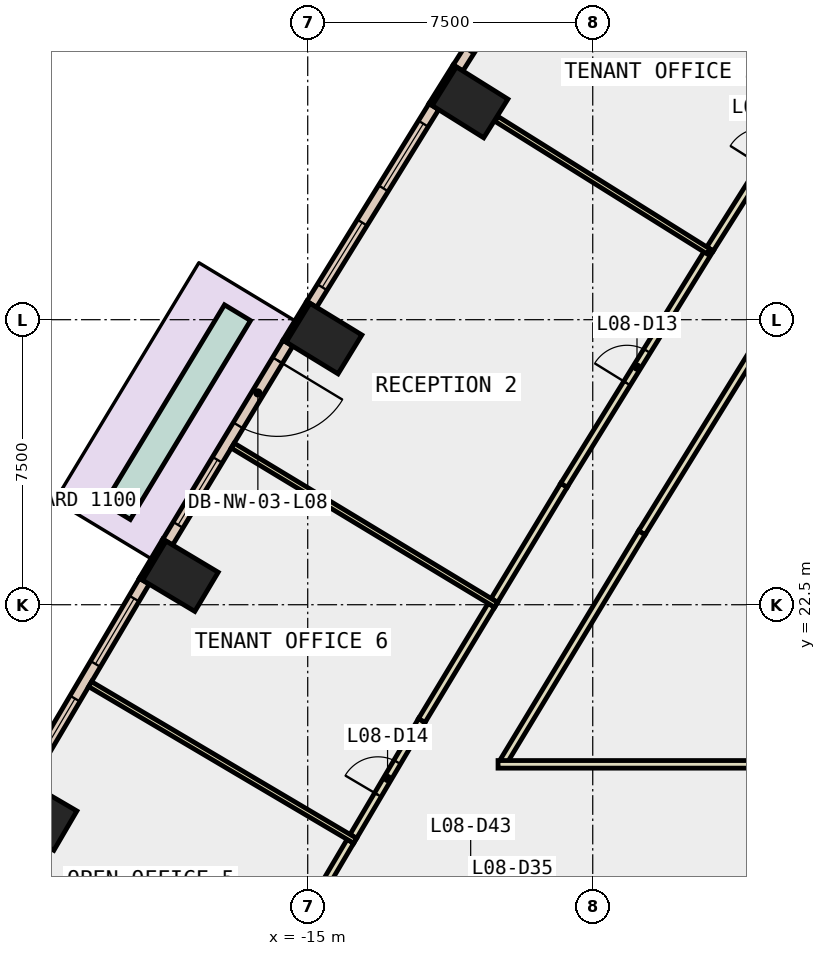
"""IFC4 building model, lengths in metres.
Left out: names, types, materials, properties, quantities, classifications, styles, units other than length and angle.
Written with IfcOpenShell. Run it as: python <this file> out.ifc"""

import sys

from ifc_helpers import new_model, si_unit, direction, frame, frame_2d, origin, origin_2d, place, context, subcontext, project, spatial, rectangle, extrude, element, fill, save


model = new_model("IFC4")
c1 = context("Model", 3, precision=1e-05, world=origin(), true_north=direction((0.0, 1.0)))
c2 = subcontext(c1, "Body", "Model", "MODEL_VIEW")
j1 = project(units=[si_unit("LENGTHUNIT", "METRE"), si_unit("PLANEANGLEUNIT", "RADIAN")], contexts=[c1])
p1 = place(None, origin())
s1 = spatial("IfcSite", under=j1, at=p1, CompositionType="ELEMENT")
p2 = place(p1, origin())
s2 = spatial("IfcBuilding", under=s1, at=p2, CompositionType="ELEMENT")
p3 = place(p2, frame((0.0, 0.0, 43.4)))
s3 = spatial("IfcBuildingStorey", under=s2, at=p3, CompositionType="ELEMENT", Elevation=43.4)
for number, where, z_axis, x_axis in (
    (1, (-10.729, 35.719, -0.4), (0.0, 0.0, 1.0), (0.53, 0.848, 0.0)),
    (2, (-14.571, 29.504, -0.4), (0.0, 0.0, 1.0), (0.522, 0.853, 0.0)),
    (3, (-18.35, 23.25, -0.4), (0.0, 0.0, 1.0), (0.513, 0.858, 0.0)),
    (4, (-22.068, 16.959, -0.4), (0.0, 0.0, 1.0), (0.504, 0.864, 0.0)),
):
    element("IfcColumn", number, at=place(p3, frame(where, z_axis=z_axis, x_axis=x_axis)), inside=s3, PredefinedType="COLUMN", context=c2, shape_type="SweptSolid", body=[
        extrude(rectangle(XDim=1.2, YDim=1.6, at=origin_2d()), origin(), (0.0, 0.0, 1.0), 4.2),
    ])
p4 = place(p3, frame((-11.132, 36.678, 0.0), z_axis=(0.0, 0.0, 1.0), x_axis=(-0.53018187123, -0.847883944546, 0.0)))
e5 = element("IfcWall", 5, at=p4, inside=s3, PredefinedType="STANDARD", context=c2, shape_type="SweptSolid", body=[
    extrude(rectangle(XDim=1.199, YDim=0.1, at=frame_2d((0.6, 0.0))), origin(), (0.0, 0.0, 1.0), 3.8),
])
for number, where, z_axis, x_axis in (
    (6, (-14.983, 30.459, 0.0), (0.0, 0.0, 1.0), (-0.522, -0.853, 0.0)),
    (7, (-18.772, 24.201, 0.0), (0.0, 0.0, 1.0), (-0.513, -0.858, 0.0)),
):
    element("IfcWall", number, at=place(p3, frame(where, z_axis=z_axis, x_axis=x_axis)), inside=s3, PredefinedType="STANDARD", context=c2, shape_type="SweptSolid", body=[
        extrude(rectangle(XDim=1.2, YDim=0.1, at=frame_2d((0.6, 0.0))), origin(), (0.0, 0.0, 1.0), 3.8),
    ])
p5 = place(p3, frame((-7.789, 41.773, 0.0), z_axis=(0.0, 0.0, 1.0), x_axis=(-0.53437888117, -0.845245059944, 0.0)))
e8 = element("IfcWall", 8, at=p5, inside=s3, PredefinedType="STANDARD", context=c2, shape_type="SweptSolid", body=[
    extrude(rectangle(XDim=6.093, YDim=0.3, at=frame_2d((3.046, 0.0))), origin(), (0.0, 0.0, 1.0), 3.8),
])
p6 = place(p5, frame((0.523, 0.0, 0.9)))
e9 = element("IfcOpeningElement", 9, at=p6, cuts=e8, PredefinedType="OPENING", context=c2, shape_type="SweptSolid", body=[
    extrude(rectangle(XDim=2.0, YDim=2.6, at=frame_2d((1.0, 1.3))), frame((0.0, 0.16, 0.0), z_axis=(0.0, -1.0, 0.0), x_axis=(1.0, 0.0, 0.0)), (0.0, 0.0, 1.0), 0.32),
])
p7 = place(p5, frame((3.57, 0.0, 0.9)))
e10 = element("IfcOpeningElement", 10, at=p7, cuts=e8, PredefinedType="OPENING", context=c2, shape_type="SweptSolid", body=[
    extrude(rectangle(XDim=2.0, YDim=2.6, at=frame_2d((1.0, 1.3))), frame((0.0, 0.16, 0.0), z_axis=(0.0, -1.0, 0.0), x_axis=(1.0, 0.0, 0.0)), (0.0, 0.0, 1.0), 0.32),
])
p8 = place(p3, frame((-11.68, 35.607, 0.0), z_axis=(0.0, 0.0, 1.0), x_axis=(-0.525791118496, -0.850613719447, 0.0)))
e11 = element("IfcWall", 11, at=p8, inside=s3, PredefinedType="STANDARD", context=c2, shape_type="SweptSolid", body=[
    extrude(rectangle(XDim=6.117, YDim=0.3, at=frame_2d((3.058, 0.0))), origin(), (0.0, 0.0, 1.0), 3.8),
])
p9 = place(p8, frame((0.529, 0.0, 0.9)))
e12 = element("IfcOpeningElement", 12, at=p9, cuts=e11, PredefinedType="OPENING", context=c2, shape_type="SweptSolid", body=[
    extrude(rectangle(XDim=2.0, YDim=2.6, at=frame_2d((1.0, 1.3))), frame((0.0, 0.16, 0.0), z_axis=(0.0, -1.0, 0.0), x_axis=(1.0, 0.0, 0.0)), (0.0, 0.0, 1.0), 0.32),
])
p10 = place(p8, frame((3.588, 0.0, 0.9)))
e13 = element("IfcOpeningElement", 13, at=p10, cuts=e11, PredefinedType="OPENING", context=c2, shape_type="SweptSolid", body=[
    extrude(rectangle(XDim=2.0, YDim=2.6, at=frame_2d((1.0, 1.3))), frame((0.0, 0.16, 0.0), z_axis=(0.0, -1.0, 0.0), x_axis=(1.0, 0.0, 0.0)), (0.0, 0.0, 1.0), 0.32),
])
p11 = place(p3, frame((-15.521, 29.382, 0.0), z_axis=(0.0, 0.0, 1.0), x_axis=(-0.517211293816, -0.855857743757, 0.0)))
e14 = element("IfcWall", 14, at=p11, inside=s3, PredefinedType="STANDARD", context=c2, shape_type="SweptSolid", body=[
    extrude(rectangle(XDim=6.116, YDim=0.3, at=frame_2d((3.058, 0.0))), origin(), (0.0, 0.0, 1.0), 3.8),
])
p12 = place(p11, frame((0.529, 0.0, 0.0)))
e15 = element("IfcOpeningElement", 15, at=p12, cuts=e14, PredefinedType="OPENING", context=c2, shape_type="SweptSolid", body=[
    extrude(rectangle(XDim=2.0, YDim=2.4, at=frame_2d((1.0, 1.2))), frame((0.0, 0.16, 0.0), z_axis=(0.0, -1.0, 0.0), x_axis=(1.0, 0.0, 0.0)), (0.0, 0.0, 1.0), 0.32),
])
p13 = place(p11, frame((3.587, 0.0, 0.9)))
e16 = element("IfcOpeningElement", 16, at=p13, cuts=e14, PredefinedType="OPENING", context=c2, shape_type="SweptSolid", body=[
    extrude(rectangle(XDim=2.0, YDim=2.6, at=frame_2d((1.0, 1.3))), frame((0.0, 0.16, 0.0), z_axis=(0.0, -1.0, 0.0), x_axis=(1.0, 0.0, 0.0)), (0.0, 0.0, 1.0), 0.32),
])
p14 = place(p3, frame((-19.299, 23.119, 0.0), z_axis=(0.0, 0.0, 1.0), x_axis=(-0.508749483145, -0.860914608658, 0.0)))
e17 = element("IfcWall", 17, at=p14, inside=s3, PredefinedType="STANDARD", context=c2, shape_type="SweptSolid", body=[
    extrude(rectangle(XDim=6.117, YDim=0.3, at=frame_2d((3.058, 0.0))), origin(), (0.0, 0.0, 1.0), 3.8),
])
p15 = place(p14, frame((0.529, 0.0, 0.9)))
e18 = element("IfcOpeningElement", 18, at=p15, cuts=e17, PredefinedType="OPENING", context=c2, shape_type="SweptSolid", body=[
    extrude(rectangle(XDim=2.0, YDim=2.6, at=frame_2d((1.0, 1.3))), frame((0.0, 0.16, 0.0), z_axis=(0.0, -1.0, 0.0), x_axis=(1.0, 0.0, 0.0)), (0.0, 0.0, 1.0), 0.32),
])
p16 = place(p14, frame((3.588, 0.0, 0.9)))
e19 = element("IfcOpeningElement", 19, at=p16, cuts=e17, PredefinedType="OPENING", context=c2, shape_type="SweptSolid", body=[
    extrude(rectangle(XDim=2.0, YDim=2.6, at=frame_2d((1.0, 1.3))), frame((0.0, 0.16, 0.0), z_axis=(0.0, -1.0, 0.0), x_axis=(1.0, 0.0, 0.0)), (0.0, 0.0, 1.0), 0.32),
])
p17 = place(p3, frame((-16.848, 30.184, 0.0), z_axis=(0.0, 0.0, 1.0), x_axis=(-0.517211293816, -0.855857743757, 0.0)))
e20 = element("IfcWall", 20, at=p17, inside=s3, PredefinedType="STANDARD", context=c2, shape_type="SweptSolid", body=[
    extrude(rectangle(XDim=6.116, YDim=0.8, at=frame_2d((3.058, 0.0))), origin(), (0.0, 0.0, 1.0), 0.8),
])
p18 = place(p3, frame((-2.419, 30.524, 0.0), z_axis=(0.0, 0.0, 1.0), x_axis=(-0.525766851327, -0.850628719269, 0.0)))
e21 = element("IfcWall", 21, at=p18, inside=s3, PredefinedType="PARTITIONING", context=c2, shape_type="SweptSolid", body=[
    extrude(rectangle(XDim=7.208, YDim=0.2, at=frame_2d((3.604, 0.0))), origin(), (0.0, 0.0, 1.0), 3.8),
])
p19 = place(p3, frame((-6.209, 24.392, 0.0), z_axis=(0.0, 0.0, 1.0), x_axis=(-0.51736780002, -0.85576314451, 0.0)))
e22 = element("IfcWall", 22, at=p19, inside=s3, PredefinedType="PARTITIONING", context=c2, shape_type="SweptSolid", body=[
    extrude(rectangle(XDim=7.018, YDim=0.2, at=frame_2d((3.509, 0.0))), origin(), (0.0, 0.0, 1.0), 3.8),
])
p20 = place(p3, frame((-4.414, 31.86, 0.0), z_axis=(0.0, 0.0, 1.0), x_axis=(0.534428477307, 0.845213702352, 0.0)))
e23 = element("IfcWall", 23, at=p20, inside=s3, PredefinedType="PARTITIONING", context=c2, shape_type="SweptSolid", body=[
    extrude(rectangle(XDim=6.158, YDim=0.2, at=frame_2d((3.079, 0.0))), origin(), (0.0, 0.0, 1.0), 3.8),
])
p21 = place(p20, frame((2.579, 0.0, 0.0)))
e24 = element("IfcOpeningElement", 24, at=p21, cuts=e23, PredefinedType="OPENING", context=c2, shape_type="SweptSolid", body=[
    extrude(rectangle(XDim=1.0, YDim=2.1, at=frame_2d((0.5, 1.05))), frame((0.0, 0.11, 0.0), z_axis=(0.0, -1.0, 0.0), x_axis=(1.0, 0.0, 0.0)), (0.0, 0.0, 1.0), 0.22),
])
p22 = place(p3, frame((-10.089, 22.613, 0.0), z_axis=(0.0, 0.0, 1.0), x_axis=(0.517280808896, 0.855815730603, 0.0)))
e25 = element("IfcWall", 25, at=p22, inside=s3, PredefinedType="PARTITIONING", context=c2, shape_type="SweptSolid", body=[
    extrude(rectangle(XDim=3.542, YDim=0.2, at=frame_2d((1.771, 0.0))), origin(), (0.0, 0.0, 1.0), 3.8),
])
p23 = place(p3, frame((-8.257, 25.644, 0.0), z_axis=(0.0, 0.0, 1.0), x_axis=(0.525857693262, 0.850572563887, 0.0)))
e26 = element("IfcWall", 26, at=p23, inside=s3, PredefinedType="PARTITIONING", context=c2, shape_type="SweptSolid", body=[
    extrude(rectangle(XDim=7.308, YDim=0.2, at=frame_2d((3.654, 0.0))), origin(), (0.0, 0.0, 1.0), 3.8),
])
p24 = place(p23, frame((3.154, 0.0, 0.0)))
e27 = element("IfcOpeningElement", 27, at=p24, cuts=e26, PredefinedType="OPENING", context=c2, shape_type="SweptSolid", body=[
    extrude(rectangle(XDim=1.0, YDim=2.1, at=frame_2d((0.5, 1.05))), frame((0.0, 0.11, 0.0), z_axis=(0.0, -1.0, 0.0), x_axis=(1.0, 0.0, 0.0)), (0.0, 0.0, 1.0), 0.22),
])
p25 = place(p3, frame((-13.8, 16.404, 0.0), z_axis=(0.0, 0.0, 1.0), x_axis=(0.508666621784, 0.860963569428, 0.0)))
e28 = element("IfcWall", 28, at=p25, inside=s3, PredefinedType="PARTITIONING", context=c2, shape_type="SweptSolid", body=[
    extrude(rectangle(XDim=3.542, YDim=0.2, at=frame_2d((1.771, 0.0))), origin(), (0.0, 0.0, 1.0), 3.8),
])
p26 = place(p25, frame((1.271, 0.0, 0.0)))
e29 = element("IfcOpeningElement", 29, at=p26, cuts=e28, PredefinedType="OPENING", context=c2, shape_type="SweptSolid", body=[
    extrude(rectangle(XDim=1.0, YDim=2.1, at=frame_2d((0.5, 1.05))), frame((0.0, 0.11, 0.0), z_axis=(0.0, -1.0, 0.0), x_axis=(1.0, 0.0, 0.0)), (0.0, 0.0, 1.0), 0.22),
])
p27 = place(p3, frame((-11.998, 19.454, 0.0), z_axis=(0.0, 0.0, 1.0), x_axis=(0.51707881094, 0.85593779171, 0.0)))
e30 = element("IfcWall", 30, at=p27, inside=s3, PredefinedType="PARTITIONING", context=c2, shape_type="SweptSolid", body=[
    extrude(rectangle(XDim=3.541, YDim=0.2, at=frame_2d((1.771, 0.0))), origin(), (0.0, 0.0, 1.0), 3.8),
])
p28 = place(p3, frame((-15.678, 13.226, 0.0), z_axis=(0.0, 0.0, 1.0), x_axis=(0.508613166028, 0.860995149431, 0.0)))
e31 = element("IfcWall", 31, at=p28, inside=s3, PredefinedType="PARTITIONING", context=c2, shape_type="SweptSolid", body=[
    extrude(rectangle(XDim=3.541, YDim=0.2, at=frame_2d((1.771, 0.0))), origin(), (0.0, 0.0, 1.0), 3.8),
])
p29 = place(p28, frame((1.271, 0.0, 0.0)))
e32 = element("IfcOpeningElement", 32, at=p29, cuts=e31, PredefinedType="OPENING", context=c2, shape_type="SweptSolid", body=[
    extrude(rectangle(XDim=1.0, YDim=2.1, at=frame_2d((0.5, 1.05))), frame((0.0, 0.11, 0.0), z_axis=(0.0, -1.0, 0.0), x_axis=(1.0, 0.0, 0.0)), (0.0, 0.0, 1.0), 0.22),
])
p30 = place(p3, frame((-9.992, 18.3, 0.0), z_axis=(0.0, 0.0, 1.0), x_axis=(1.0, 0.0, 0.0)))
e33 = element("IfcWall", 33, at=p30, inside=s3, PredefinedType="PARTITIONING", context=c2, shape_type="SweptSolid", body=[
    extrude(rectangle(XDim=9.592, YDim=0.2, at=frame_2d((4.796, 0.0))), origin(), (0.0, 0.0, 1.0), 3.8),
])
p31 = place(p3, frame((-1.06, 36.98, 0.0), z_axis=(0.0, 0.0, 1.0), x_axis=(-0.770307911054, 0.6376721118, 0.0)))
e34 = element("IfcWall", 34, at=p31, inside=s3, PredefinedType="PARTITIONING", context=c2, shape_type="SweptSolid", body=[
    extrude(rectangle(XDim=6.748, YDim=0.15, at=frame_2d((3.374, 0.0))), origin(), (0.0, 0.0, 1.0), 3.8),
])
p32 = place(p3, frame((-4.454, 31.796, 0.0), z_axis=(0.0, 0.0, 1.0), x_axis=(-0.847954529694, 0.530068972467, 0.0)))
e35 = element("IfcWall", 35, at=p32, inside=s3, PredefinedType="PARTITIONING", context=c2, shape_type="SweptSolid", body=[
    extrude(rectangle(XDim=6.58, YDim=0.15, at=frame_2d((3.29, 0.0))), origin(), (0.0, 0.0, 1.0), 3.8),
])
p33 = place(p3, frame((-10.042, 22.497, 0.0), z_axis=(0.0, 0.0, 1.0), x_axis=(-0.855818252, 0.517276637346, 0.0)))
e36 = element("IfcWall", 36, at=p33, inside=s3, PredefinedType="PARTITIONING", context=c2, shape_type="SweptSolid", body=[
    extrude(rectangle(XDim=8.1, YDim=0.15, at=frame_2d((4.05, 0.0))), origin(), (0.0, 0.0, 1.0), 3.8),
])
p34 = place(p3, frame((-13.752, 16.289, 0.0), z_axis=(0.0, 0.0, 1.0), x_axis=(-0.86093852802, 0.508709004216, 0.0)))
e37 = element("IfcWall", 37, at=p34, inside=s3, PredefinedType="PARTITIONING", context=c2, shape_type="SweptSolid", body=[
    extrude(rectangle(XDim=8.101, YDim=0.15, at=frame_2d((4.05, 0.0))), origin(), (0.0, 0.0, 1.0), 3.8),
])
p35 = place(p9, origin())
e38 = element("IfcWindow", 38, at=p35, inside=s3, PartitioningType="SINGLE_PANEL", PredefinedType="WINDOW", context=c2, shape_type="SweptSolid", body=[
    extrude(rectangle(XDim=2.0, YDim=2.6, at=frame_2d((1.0, 1.3))), frame((0.0, 0.03, 0.0), z_axis=(0.0, -1.0, 0.0), x_axis=(1.0, 0.0, 0.0)), (0.0, 0.0, 1.0), 0.06),
])
fill(e12, e38)
p36 = place(p10, origin())
e39 = element("IfcWindow", 39, at=p36, inside=s3, PartitioningType="SINGLE_PANEL", PredefinedType="WINDOW", context=c2, shape_type="SweptSolid", body=[
    extrude(rectangle(XDim=2.0, YDim=2.6, at=frame_2d((1.0, 1.3))), frame((0.0, 0.03, 0.0), z_axis=(0.0, -1.0, 0.0), x_axis=(1.0, 0.0, 0.0)), (0.0, 0.0, 1.0), 0.06),
])
fill(e13, e39)
p37 = place(p12, origin())
e40 = element("IfcDoor", 40, at=p37, inside=s3, OperationType="SLIDING_TO_LEFT", PredefinedType="DOOR", context=c2, shape_type="SweptSolid", body=[
    extrude(rectangle(XDim=2.0, YDim=2.4, at=frame_2d((1.0, 1.2))), frame((0.0, 0.025, 0.0), z_axis=(0.0, -1.0, 0.0), x_axis=(1.0, 0.0, 0.0)), (0.0, 0.0, 1.0), 0.05),
])
fill(e15, e40)
p38 = place(p13, origin())
e41 = element("IfcWindow", 41, at=p38, inside=s3, PartitioningType="SINGLE_PANEL", PredefinedType="WINDOW", context=c2, shape_type="SweptSolid", body=[
    extrude(rectangle(XDim=2.0, YDim=2.6, at=frame_2d((1.0, 1.3))), frame((0.0, 0.03, 0.0), z_axis=(0.0, -1.0, 0.0), x_axis=(1.0, 0.0, 0.0)), (0.0, 0.0, 1.0), 0.06),
])
fill(e16, e41)
p39 = place(p15, origin())
e42 = element("IfcWindow", 42, at=p39, inside=s3, PartitioningType="SINGLE_PANEL", PredefinedType="WINDOW", context=c2, shape_type="SweptSolid", body=[
    extrude(rectangle(XDim=2.0, YDim=2.6, at=frame_2d((1.0, 1.3))), frame((0.0, 0.03, 0.0), z_axis=(0.0, -1.0, 0.0), x_axis=(1.0, 0.0, 0.0)), (0.0, 0.0, 1.0), 0.06),
])
fill(e18, e42)
p40 = place(p16, origin())
e43 = element("IfcWindow", 43, at=p40, inside=s3, PartitioningType="SINGLE_PANEL", PredefinedType="WINDOW", context=c2, shape_type="SweptSolid", body=[
    extrude(rectangle(XDim=2.0, YDim=2.6, at=frame_2d((1.0, 1.3))), frame((0.0, 0.03, 0.0), z_axis=(0.0, -1.0, 0.0), x_axis=(1.0, 0.0, 0.0)), (0.0, 0.0, 1.0), 0.06),
])
fill(e19, e43)
p41 = place(p24, origin())
e44 = element("IfcDoor", 44, at=p41, inside=s3, OperationType="SINGLE_SWING_LEFT", PredefinedType="DOOR", context=c2, shape_type="SweptSolid", body=[
    extrude(rectangle(XDim=1.0, YDim=2.1, at=frame_2d((0.5, 1.05))), frame((0.0, 0.025, 0.0), z_axis=(0.0, -1.0, 0.0), x_axis=(1.0, 0.0, 0.0)), (0.0, 0.0, 1.0), 0.05),
])
fill(e27, e44)
p42 = place(p26, origin())
e45 = element("IfcDoor", 45, at=p42, inside=s3, OperationType="SINGLE_SWING_LEFT", PredefinedType="DOOR", context=c2, shape_type="SweptSolid", body=[
    extrude(rectangle(XDim=1.0, YDim=2.1, at=frame_2d((0.5, 1.05))), frame((0.0, 0.025, 0.0), z_axis=(0.0, -1.0, 0.0), x_axis=(1.0, 0.0, 0.0)), (0.0, 0.0, 1.0), 0.05),
])
fill(e29, e45)
save(model, sys.argv[1])
